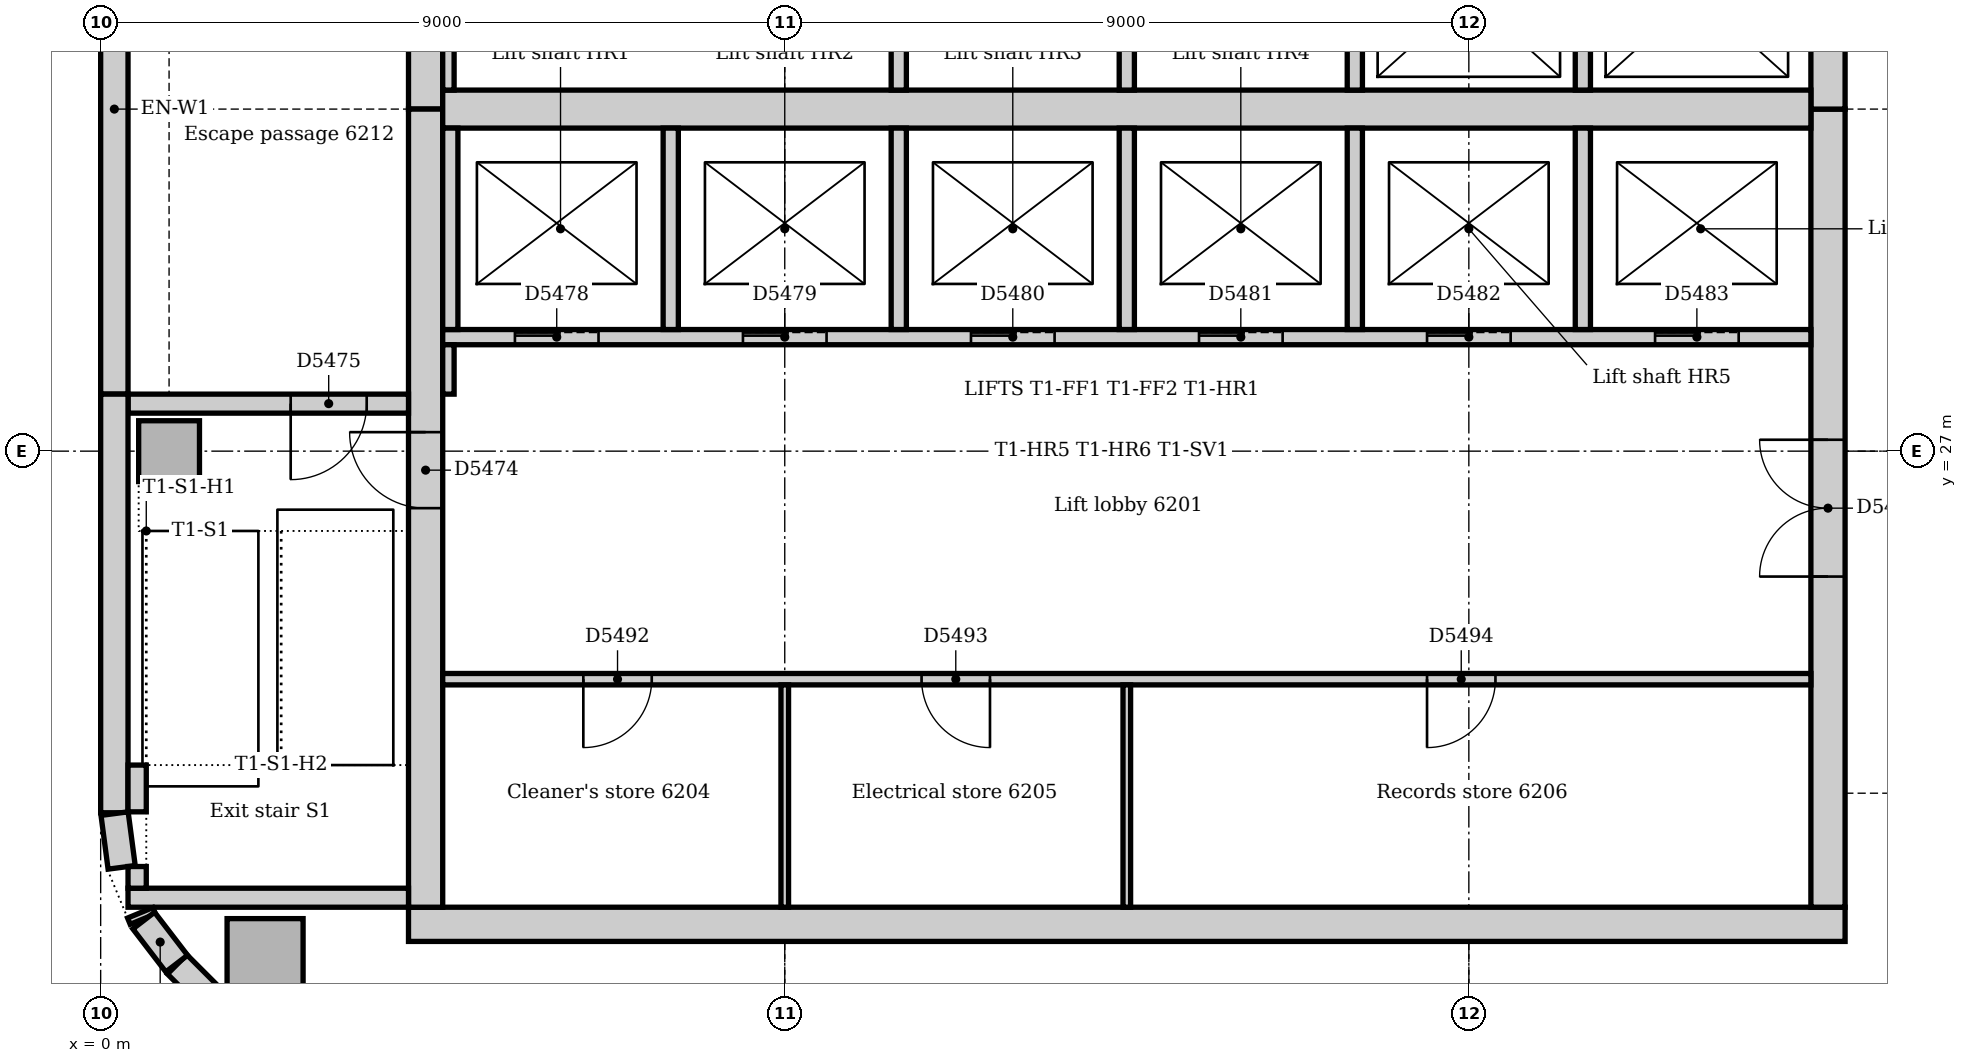
"""IFC4 building model, lengths in metres.
Left out: names, types, materials, properties, quantities, classifications, styles, units other than length and angle.
Written with IfcOpenShell. Run it as: python <this file> out.ifc"""

import sys

from ifc_helpers import new_model, si_unit, direction, frame, frame_2d, origin, origin_2d, place, context, subcontext, project, spatial, rectangle, extrude, element, fill, save


model = new_model("IFC4")
c1 = context("Model", 3, precision=1e-05, world=origin(), true_north=direction((0.0, 1.0)))
c2 = subcontext(c1, "Body", "Model", "MODEL_VIEW")
j1 = project(units=[si_unit("LENGTHUNIT", "METRE"), si_unit("PLANEANGLEUNIT", "RADIAN")], contexts=[c1])
p1 = place(None, origin())
s1 = spatial("IfcSite", under=j1, at=p1, CompositionType="ELEMENT")
p2 = place(p1, origin())
s2 = spatial("IfcBuilding", under=s1, at=p2, CompositionType="ELEMENT")
p3 = place(p2, frame((0.0, 0.0, 259.0)))
s3 = spatial("IfcBuildingStorey", under=s2, at=p3, CompositionType="ELEMENT", Elevation=259.0)
p4 = place(p3, frame((4.05, 20.775, 0.0), z_axis=(0.0, 0.0, 1.0), x_axis=(1.0, 0.0, 0.0)))
e1 = element("IfcWall", 1, at=p4, inside=s3, PredefinedType="SOLIDWALL", context=c2, shape_type="SweptSolid", body=[
    extrude(rectangle(XDim=18.9, YDim=0.45, at=frame_2d((9.45, 0.0))), origin(), (0.0, 0.0, 1.0), 4.0),
])
p5 = place(p3, frame((22.725, 21.0, 0.0), z_axis=(0.0, 0.0, 1.0), x_axis=(0.0, 1.0, 0.0)))
e2 = element("IfcWall", 2, at=p5, inside=s3, PredefinedType="SOLIDWALL", context=c2, shape_type="SweptSolid", body=[
    extrude(rectangle(XDim=10.5, YDim=0.45, at=frame_2d((5.25, 0.0))), origin(), (0.0, 0.0, 1.0), 4.0),
])
p6 = place(p5, frame((4.35, 0.0, 0.0)))
e3 = element("IfcOpeningElement", 3, at=p6, cuts=e2, PredefinedType="OPENING", context=c2, shape_type="SweptSolid", body=[
    extrude(rectangle(XDim=1.8, YDim=2.1, at=frame_2d((0.9, 1.05))), frame((0.0, 0.235, 0.0), z_axis=(0.0, -1.0, 0.0), x_axis=(1.0, 0.0, 0.0)), (0.0, 0.0, 1.0), 0.47),
])
p7 = place(p3, frame((22.725, 31.5, 0.0), z_axis=(0.0, 0.0, 1.0), x_axis=(0.0, 1.0, 0.0)))
e4 = element("IfcWall", 4, at=p7, inside=s3, PredefinedType="SOLIDWALL", context=c2, shape_type="SweptSolid", body=[
    extrude(rectangle(XDim=10.5, YDim=0.45, at=frame_2d((5.25, 0.0))), origin(), (0.0, 0.0, 1.0), 4.0),
])
p8 = place(p7, frame((3.15, 0.0, 0.0)))
e5 = element("IfcOpeningElement", 5, at=p8, cuts=e4, PredefinedType="OPENING", context=c2, shape_type="SweptSolid", body=[
    extrude(rectangle(XDim=1.0, YDim=2.1, at=frame_2d((0.5, 1.05))), frame((0.0, 0.235, 0.0), z_axis=(0.0, -1.0, 0.0), x_axis=(1.0, 0.0, 0.0)), (0.0, 0.0, 1.0), 0.47),
])
p9 = place(p7, frame((5.2, 0.0, 0.0)))
e6 = element("IfcOpeningElement", 6, at=p9, cuts=e4, PredefinedType="OPENING", context=c2, shape_type="SweptSolid", body=[
    extrude(rectangle(XDim=1.0, YDim=2.1, at=frame_2d((0.5, 1.05))), frame((0.0, 0.235, 0.0), z_axis=(0.0, -1.0, 0.0), x_axis=(1.0, 0.0, 0.0)), (0.0, 0.0, 1.0), 0.47),
])
p10 = place(p3, frame((4.275, 42.0, 0.0), z_axis=(0.0, 0.0, 1.0), x_axis=(0.0, -1.0, 0.0)))
e7 = element("IfcWall", 7, at=p10, inside=s3, PredefinedType="SOLIDWALL", context=c2, shape_type="SweptSolid", body=[
    extrude(rectangle(XDim=10.5, YDim=0.45, at=frame_2d((5.25, 0.0))), origin(), (0.0, 0.0, 1.0), 4.0),
])
p11 = place(p10, frame((5.3, 0.0, 0.0)))
e8 = element("IfcOpeningElement", 8, at=p11, cuts=e7, PredefinedType="OPENING", context=c2, shape_type="SweptSolid", body=[
    extrude(rectangle(XDim=1.0, YDim=2.1, at=frame_2d((0.5, 1.05))), frame((0.0, 0.235, 0.0), z_axis=(0.0, -1.0, 0.0), x_axis=(1.0, 0.0, 0.0)), (0.0, 0.0, 1.0), 0.47),
])
p12 = place(p3, frame((4.275, 31.5, 0.0), z_axis=(0.0, 0.0, 1.0), x_axis=(0.0, -1.0, 0.0)))
e9 = element("IfcWall", 9, at=p12, inside=s3, PredefinedType="SOLIDWALL", context=c2, shape_type="SweptSolid", body=[
    extrude(rectangle(XDim=10.5, YDim=0.45, at=frame_2d((5.25, 0.0))), origin(), (0.0, 0.0, 1.0), 4.0),
])
p13 = place(p12, frame((4.25, 0.0, 0.0)))
e10 = element("IfcOpeningElement", 10, at=p13, cuts=e9, PredefinedType="OPENING", context=c2, shape_type="SweptSolid", body=[
    extrude(rectangle(XDim=1.0, YDim=2.1, at=frame_2d((0.5, 1.05))), frame((0.0, 0.235, 0.0), z_axis=(0.0, -1.0, 0.0), x_axis=(1.0, 0.0, 0.0)), (0.0, 0.0, 1.0), 0.47),
])
p14 = place(p3, frame((4.5, 31.5, 0.0), z_axis=(0.0, 0.0, 1.0), x_axis=(1.0, 0.0, 0.0)))
e11 = element("IfcWall", 11, at=p14, inside=s3, PredefinedType="SOLIDWALL", context=c2, shape_type="SweptSolid", body=[
    extrude(rectangle(XDim=18.0, YDim=0.5, at=frame_2d((9.0, 0.0))), origin(), (0.0, 0.0, 1.0), 4.0),
])
p15 = place(p3, frame((0.36, 21.125, 0.0), z_axis=(0.0, 0.0, 1.0), x_axis=(1.0, 0.0, 0.0)))
e12 = element("IfcWall", 12, at=p15, inside=s3, PredefinedType="SOLIDWALL", context=c2, shape_type="SweptSolid", body=[
    extrude(rectangle(XDim=3.69, YDim=0.25, at=frame_2d((1.845, 0.0))), origin(), (0.0, 0.0, 1.0), 4.0),
])
p16 = place(p3, frame((4.05, 27.625, 0.0), z_axis=(0.0, 0.0, 1.0), x_axis=(-1.0, 0.0, 0.0)))
e13 = element("IfcWall", 13, at=p16, inside=s3, PredefinedType="SOLIDWALL", context=c2, shape_type="SweptSolid", body=[
    extrude(rectangle(XDim=3.69, YDim=0.25, at=frame_2d((1.845, 0.0))), origin(), (0.0, 0.0, 1.0), 4.0),
])
p17 = place(p16, frame((0.55, 0.0, 0.0)))
e14 = element("IfcOpeningElement", 14, at=p17, cuts=e13, PredefinedType="OPENING", context=c2, shape_type="SweptSolid", body=[
    extrude(rectangle(XDim=1.0, YDim=2.1, at=frame_2d((0.5, 1.05))), frame((0.0, 0.135, 0.0), z_axis=(0.0, -1.0, 0.0), x_axis=(1.0, 0.0, 0.0)), (0.0, 0.0, 1.0), 0.27),
])
p18 = place(p3, frame((2.163, 20.35, 0.0), z_axis=(0.0, 0.0, 1.0), x_axis=(1.0, 0.0, 0.0)))
e15 = element("IfcColumn", 15, at=p18, inside=s3, PredefinedType="COLUMN", context=c2, shape_type="SweptSolid", body=[
    extrude(rectangle(XDim=1.0, YDim=1.0, at=origin_2d()), origin(), (0.0, 0.0, 1.0), 3.85),
])
p19 = place(p3, frame((0.9, 27.0, 0.0), z_axis=(0.0, 0.0, 1.0), x_axis=(1.0, 0.0, 0.0)))
e16 = element("IfcColumn", 16, at=p19, inside=s3, PredefinedType="COLUMN", context=c2, shape_type="SweptSolid", body=[
    extrude(rectangle(XDim=0.8, YDim=0.8, at=origin_2d()), origin(), (0.0, 0.0, 1.0), 4.0),
])
p20 = place(p3, frame((0.18, 35.25, 0.0), z_axis=(0.0, 0.0, 1.0), x_axis=(0.0, -1.0, 0.0)))
e17 = element("IfcWall", 17, at=p20, inside=s3, PredefinedType="STANDARD", context=c2, shape_type="SweptSolid", body=[
    extrude(rectangle(XDim=7.5, YDim=0.36, at=frame_2d((3.75, 0.0))), origin(), (0.0, 0.0, 1.0), 3.85),
])
p21 = place(p3, frame((0.18, 27.75, 0.0), z_axis=(0.0, 0.0, 1.0), x_axis=(0.0, -1.0, 0.0)))
e18 = element("IfcWall", 18, at=p21, inside=s3, PredefinedType="STANDARD", context=c2, shape_type="SweptSolid", body=[
    extrude(rectangle(XDim=5.507, YDim=0.36, at=frame_2d((2.754, 0.0))), origin(), (0.0, 0.0, 1.0), 3.85),
])
p22 = place(p3, frame((1.006, 20.249, 0.0), z_axis=(0.0, 0.0, 1.0), x_axis=(0.707106781187, -0.707106781187, 0.0)))
e19 = element("IfcWall", 19, at=p22, inside=s3, PredefinedType="STANDARD", context=c2, shape_type="SweptSolid", body=[
    extrude(rectangle(XDim=1.757, YDim=0.36, at=frame_2d((0.879, 0.0))), origin(), (0.0, 0.0, 1.0), 3.85),
])
p23 = place(p3, frame((0.183, 22.231, 0.0), z_axis=(0.0, 0.0, 1.0), x_axis=(0.13055608231, -0.99144092581, 0.0)))
e20 = element("IfcWall", 20, at=p23, inside=s3, PredefinedType="STANDARD", context=c2, shape_type="SweptSolid", body=[
    extrude(rectangle(XDim=0.713, YDim=0.36, at=frame_2d((0.356, 0.0))), origin(), (0.0, 0.0, 1.0), 3.85),
])
p24 = place(p3, frame((0.521, 20.927, 0.0), z_axis=(0.0, 0.0, 1.0), x_axis=(0.382549378284, -0.923935048136, 0.0)))
e21 = element("IfcWall", 21, at=p24, inside=s3, PredefinedType="STANDARD", context=c2, shape_type="SweptSolid", body=[
    extrude(rectangle(XDim=0.089, YDim=0.36, at=frame_2d((0.045, 0.0))), origin(), (0.0, 0.0, 1.0), 3.85),
])
p25 = place(p3, frame((0.566, 20.825, 0.0), z_axis=(0.0, 0.0, 1.0), x_axis=(0.608802368033, -0.793321924995, 0.0)))
e22 = element("IfcWall", 22, at=p25, inside=s3, PredefinedType="STANDARD", context=c2, shape_type="SweptSolid", body=[
    extrude(rectangle(XDim=0.713, YDim=0.36, at=frame_2d((0.357, 0.0))), origin(), (0.0, 0.0, 1.0), 3.85),
])
p26 = place(p3, frame((0.48, 21.25, 0.0), z_axis=(0.0, 0.0, 1.0), x_axis=(0.0, 1.0, 0.0)))
e23 = element("IfcWall", 23, at=p26, inside=s3, PredefinedType="STANDARD", context=c2, shape_type="SweptSolid", body=[
    extrude(rectangle(XDim=0.285, YDim=0.24, at=frame_2d((0.143, 0.0))), origin(), (0.0, 0.0, 1.0), 4.0),
])
p27 = place(p3, frame((0.48, 22.255, 0.0), z_axis=(0.0, 0.0, 1.0), x_axis=(0.0, 1.0, 0.0)))
e24 = element("IfcWall", 24, at=p27, inside=s3, PredefinedType="STANDARD", context=c2, shape_type="SweptSolid", body=[
    extrude(rectangle(XDim=0.615, YDim=0.24, at=frame_2d((0.307, 0.0))), origin(), (0.0, 0.0, 1.0), 4.0),
])
p28 = place(p3, frame((4.5, 28.5, 0.0), z_axis=(0.0, 0.0, 1.0), x_axis=(1.0, 0.0, 0.0)))
e25 = element("IfcWall", 25, at=p28, inside=s3, PredefinedType="PARTITIONING", context=c2, shape_type="SweptSolid", body=[
    extrude(rectangle(XDim=18.0, YDim=0.2, at=frame_2d((9.0, 0.0))), origin(), (0.0, 0.0, 1.0), 3.85),
])
p29 = place(p28, frame((0.95, 0.0, 0.0)))
e26 = element("IfcOpeningElement", 26, at=p29, cuts=e25, PredefinedType="OPENING", context=c2, shape_type="SweptSolid", body=[
    extrude(rectangle(XDim=1.1, YDim=2.1, at=frame_2d((0.55, 1.05))), frame((0.0, 0.11, 0.0), z_axis=(0.0, -1.0, 0.0), x_axis=(1.0, 0.0, 0.0)), (0.0, 0.0, 1.0), 0.22),
])
p30 = place(p28, frame((3.95, 0.0, 0.0)))
e27 = element("IfcOpeningElement", 27, at=p30, cuts=e25, PredefinedType="OPENING", context=c2, shape_type="SweptSolid", body=[
    extrude(rectangle(XDim=1.1, YDim=2.1, at=frame_2d((0.55, 1.05))), frame((0.0, 0.11, 0.0), z_axis=(0.0, -1.0, 0.0), x_axis=(1.0, 0.0, 0.0)), (0.0, 0.0, 1.0), 0.22),
])
p31 = place(p28, frame((6.95, 0.0, 0.0)))
e28 = element("IfcOpeningElement", 28, at=p31, cuts=e25, PredefinedType="OPENING", context=c2, shape_type="SweptSolid", body=[
    extrude(rectangle(XDim=1.1, YDim=2.1, at=frame_2d((0.55, 1.05))), frame((0.0, 0.11, 0.0), z_axis=(0.0, -1.0, 0.0), x_axis=(1.0, 0.0, 0.0)), (0.0, 0.0, 1.0), 0.22),
])
p32 = place(p28, frame((9.95, 0.0, 0.0)))
e29 = element("IfcOpeningElement", 29, at=p32, cuts=e25, PredefinedType="OPENING", context=c2, shape_type="SweptSolid", body=[
    extrude(rectangle(XDim=1.1, YDim=2.1, at=frame_2d((0.55, 1.05))), frame((0.0, 0.11, 0.0), z_axis=(0.0, -1.0, 0.0), x_axis=(1.0, 0.0, 0.0)), (0.0, 0.0, 1.0), 0.22),
])
p33 = place(p28, frame((12.95, 0.0, 0.0)))
e30 = element("IfcOpeningElement", 30, at=p33, cuts=e25, PredefinedType="OPENING", context=c2, shape_type="SweptSolid", body=[
    extrude(rectangle(XDim=1.1, YDim=2.1, at=frame_2d((0.55, 1.05))), frame((0.0, 0.11, 0.0), z_axis=(0.0, -1.0, 0.0), x_axis=(1.0, 0.0, 0.0)), (0.0, 0.0, 1.0), 0.22),
])
p34 = place(p28, frame((15.95, 0.0, 0.0)))
e31 = element("IfcOpeningElement", 31, at=p34, cuts=e25, PredefinedType="OPENING", context=c2, shape_type="SweptSolid", body=[
    extrude(rectangle(XDim=1.1, YDim=2.1, at=frame_2d((0.55, 1.05))), frame((0.0, 0.11, 0.0), z_axis=(0.0, -1.0, 0.0), x_axis=(1.0, 0.0, 0.0)), (0.0, 0.0, 1.0), 0.22),
])
for number, where, z_axis, x_axis in (
    (32, (10.5, 28.6, 0.0), (0.0, 0.0, 1.0), (0.0, 1.0, 0.0)),
    (33, (10.5, 31.75, 0.0), (0.0, 0.0, 1.0), (0.0, 1.0, 0.0)),
    (34, (13.5, 28.6, 0.0), (0.0, 0.0, 1.0), (0.0, 1.0, 0.0)),
    (35, (13.5, 31.75, 0.0), (0.0, 0.0, 1.0), (0.0, 1.0, 0.0)),
    (36, (16.5, 28.6, 0.0), (0.0, 0.0, 1.0), (0.0, 1.0, 0.0)),
    (37, (16.5, 31.75, 0.0), (0.0, 0.0, 1.0), (0.0, 1.0, 0.0)),
    (38, (19.5, 28.6, 0.0), (0.0, 0.0, 1.0), (0.0, 1.0, 0.0)),
    (39, (19.5, 31.75, 0.0), (0.0, 0.0, 1.0), (0.0, 1.0, 0.0)),
    (40, (4.6, 28.6, 0.0), (0.0, 0.0, 1.0), (0.0, 1.0, 0.0)),
    (41, (7.5, 28.6, 0.0), (0.0, 0.0, 1.0), (0.0, 1.0, 0.0)),
):
    element("IfcWall", number, at=place(p3, frame(where, z_axis=z_axis, x_axis=x_axis)), inside=s3, PredefinedType="PARTITIONING", context=c2, shape_type="SweptSolid", body=[
        extrude(rectangle(XDim=2.65, YDim=0.2, at=frame_2d((1.325, 0.0))), origin(), (0.0, 0.0, 1.0), 3.85),
    ])
p35 = place(p3, frame((4.5, 24.0, 0.0), z_axis=(0.0, 0.0, 1.0), x_axis=(1.0, 0.0, 0.0)))
e42 = element("IfcWall", 42, at=p35, inside=s3, PredefinedType="PARTITIONING", context=c2, shape_type="SweptSolid", body=[
    extrude(rectangle(XDim=18.0, YDim=0.15, at=frame_2d((9.0, 0.0))), origin(), (0.0, 0.0, 1.0), 3.85),
])
p36 = place(p35, frame((1.85, 0.0, 0.0)))
e43 = element("IfcOpeningElement", 43, at=p36, cuts=e42, PredefinedType="OPENING", context=c2, shape_type="SweptSolid", body=[
    extrude(rectangle(XDim=0.9, YDim=2.1, at=frame_2d((0.45, 1.05))), frame((0.0, 0.085, 0.0), z_axis=(0.0, -1.0, 0.0), x_axis=(1.0, 0.0, 0.0)), (0.0, 0.0, 1.0), 0.17),
])
p37 = place(p35, frame((6.3, 0.0, 0.0)))
e44 = element("IfcOpeningElement", 44, at=p37, cuts=e42, PredefinedType="OPENING", context=c2, shape_type="SweptSolid", body=[
    extrude(rectangle(XDim=0.9, YDim=2.1, at=frame_2d((0.45, 1.05))), frame((0.0, 0.085, 0.0), z_axis=(0.0, -1.0, 0.0), x_axis=(1.0, 0.0, 0.0)), (0.0, 0.0, 1.0), 0.17),
])
p38 = place(p35, frame((12.95, 0.0, 0.0)))
e45 = element("IfcOpeningElement", 45, at=p38, cuts=e42, PredefinedType="OPENING", context=c2, shape_type="SweptSolid", body=[
    extrude(rectangle(XDim=0.9, YDim=2.1, at=frame_2d((0.45, 1.05))), frame((0.0, 0.085, 0.0), z_axis=(0.0, -1.0, 0.0), x_axis=(1.0, 0.0, 0.0)), (0.0, 0.0, 1.0), 0.17),
])
p39 = place(p3, frame((4.575, 31.75, 0.0), z_axis=(0.0, 0.0, 1.0), x_axis=(0.0, 1.0, 0.0)))
e46 = element("IfcWall", 46, at=p39, inside=s3, PredefinedType="PARTITIONING", context=c2, shape_type="SweptSolid", body=[
    extrude(rectangle(XDim=2.675, YDim=0.15, at=frame_2d((1.337, 0.0))), origin(), (0.0, 0.0, 1.0), 3.85),
])
p40 = place(p3, frame((4.575, 27.75, 0.0), z_axis=(0.0, 0.0, 1.0), x_axis=(0.0, 1.0, 0.0)))
e47 = element("IfcWall", 47, at=p40, inside=s3, PredefinedType="PARTITIONING", context=c2, shape_type="SweptSolid", body=[
    extrude(rectangle(XDim=0.65, YDim=0.15, at=frame_2d((0.325, 0.0))), origin(), (0.0, 0.0, 1.0), 3.85),
])
for number, where, z_axis, x_axis in (
    (48, (9.0, 21.0, 0.0), (0.0, 0.0, 1.0), (0.0, 1.0, 0.0)),
    (49, (13.5, 21.0, 0.0), (0.0, 0.0, 1.0), (0.0, 1.0, 0.0)),
):
    element("IfcWall", number, at=place(p3, frame(where, z_axis=z_axis, x_axis=x_axis)), inside=s3, PredefinedType="PARTITIONING", context=c2, shape_type="SweptSolid", body=[
        extrude(rectangle(XDim=2.925, YDim=0.1, at=frame_2d((1.462, 0.0))), origin(), (0.0, 0.0, 1.0), 3.85),
    ])
p41 = place(p13, frame((1.0, 0.0, 0.0), z_axis=(0.0, 0.0, 1.0), x_axis=(-1.0, 0.0, 0.0)))
e50 = element("IfcDoor", 50, at=p41, inside=s3, OperationType="SINGLE_SWING_RIGHT", PredefinedType="DOOR", context=c2, shape_type="SweptSolid", body=[
    extrude(rectangle(XDim=1.0, YDim=2.1, at=frame_2d((0.5, 1.05))), frame((0.0, 0.025, 0.0), z_axis=(0.0, -1.0, 0.0), x_axis=(1.0, 0.0, 0.0)), (0.0, 0.0, 1.0), 0.05),
])
fill(e10, e50)
p42 = place(p17, origin())
e51 = element("IfcDoor", 51, at=p42, inside=s3, OperationType="SINGLE_SWING_RIGHT", PredefinedType="DOOR", context=c2, shape_type="SweptSolid", body=[
    extrude(rectangle(XDim=1.0, YDim=2.1, at=frame_2d((0.5, 1.05))), frame((0.0, 0.025, 0.0), z_axis=(0.0, -1.0, 0.0), x_axis=(1.0, 0.0, 0.0)), (0.0, 0.0, 1.0), 0.05),
])
fill(e14, e51)
p43 = place(p29, origin())
e52 = element("IfcDoor", 52, at=p43, inside=s3, OperationType="SLIDING_TO_LEFT", PredefinedType="DOOR", context=c2, shape_type="SweptSolid", body=[
    extrude(rectangle(XDim=1.1, YDim=2.1, at=frame_2d((0.55, 1.05))), frame((0.0, 0.025, 0.0), z_axis=(0.0, -1.0, 0.0), x_axis=(1.0, 0.0, 0.0)), (0.0, 0.0, 1.0), 0.05),
])
fill(e26, e52)
p44 = place(p30, origin())
e53 = element("IfcDoor", 53, at=p44, inside=s3, OperationType="SLIDING_TO_LEFT", PredefinedType="DOOR", context=c2, shape_type="SweptSolid", body=[
    extrude(rectangle(XDim=1.1, YDim=2.1, at=frame_2d((0.55, 1.05))), frame((0.0, 0.025, 0.0), z_axis=(0.0, -1.0, 0.0), x_axis=(1.0, 0.0, 0.0)), (0.0, 0.0, 1.0), 0.05),
])
fill(e27, e53)
p45 = place(p31, origin())
e54 = element("IfcDoor", 54, at=p45, inside=s3, OperationType="SLIDING_TO_LEFT", PredefinedType="DOOR", context=c2, shape_type="SweptSolid", body=[
    extrude(rectangle(XDim=1.1, YDim=2.1, at=frame_2d((0.55, 1.05))), frame((0.0, 0.025, 0.0), z_axis=(0.0, -1.0, 0.0), x_axis=(1.0, 0.0, 0.0)), (0.0, 0.0, 1.0), 0.05),
])
fill(e28, e54)
p46 = place(p32, origin())
e55 = element("IfcDoor", 55, at=p46, inside=s3, OperationType="SLIDING_TO_LEFT", PredefinedType="DOOR", context=c2, shape_type="SweptSolid", body=[
    extrude(rectangle(XDim=1.1, YDim=2.1, at=frame_2d((0.55, 1.05))), frame((0.0, 0.025, 0.0), z_axis=(0.0, -1.0, 0.0), x_axis=(1.0, 0.0, 0.0)), (0.0, 0.0, 1.0), 0.05),
])
fill(e29, e55)
p47 = place(p33, origin())
e56 = element("IfcDoor", 56, at=p47, inside=s3, OperationType="SLIDING_TO_LEFT", PredefinedType="DOOR", context=c2, shape_type="SweptSolid", body=[
    extrude(rectangle(XDim=1.1, YDim=2.1, at=frame_2d((0.55, 1.05))), frame((0.0, 0.025, 0.0), z_axis=(0.0, -1.0, 0.0), x_axis=(1.0, 0.0, 0.0)), (0.0, 0.0, 1.0), 0.05),
])
fill(e30, e56)
p48 = place(p34, origin())
e57 = element("IfcDoor", 57, at=p48, inside=s3, OperationType="SLIDING_TO_LEFT", PredefinedType="DOOR", context=c2, shape_type="SweptSolid", body=[
    extrude(rectangle(XDim=1.1, YDim=2.1, at=frame_2d((0.55, 1.05))), frame((0.0, 0.025, 0.0), z_axis=(0.0, -1.0, 0.0), x_axis=(1.0, 0.0, 0.0)), (0.0, 0.0, 1.0), 0.05),
])
fill(e31, e57)
p49 = place(p6, origin())
e58 = element("IfcDoor", 58, at=p49, inside=s3, OperationType="DOUBLE_DOOR_DOUBLE_SWING", PredefinedType="DOOR", context=c2, shape_type="SweptSolid", body=[
    extrude(rectangle(XDim=1.8, YDim=2.1, at=frame_2d((0.9, 1.05))), frame((0.0, 0.025, 0.0), z_axis=(0.0, -1.0, 0.0), x_axis=(1.0, 0.0, 0.0)), (0.0, 0.0, 1.0), 0.05),
])
fill(e3, e58)
p50 = place(p36, frame((0.9, 0.0, 0.0), z_axis=(0.0, 0.0, 1.0), x_axis=(-1.0, 0.0, 0.0)))
e59 = element("IfcDoor", 59, at=p50, inside=s3, OperationType="SINGLE_SWING_RIGHT", PredefinedType="DOOR", context=c2, shape_type="SweptSolid", body=[
    extrude(rectangle(XDim=0.9, YDim=2.1, at=frame_2d((0.45, 1.05))), frame((0.0, 0.025, 0.0), z_axis=(0.0, -1.0, 0.0), x_axis=(1.0, 0.0, 0.0)), (0.0, 0.0, 1.0), 0.05),
])
fill(e43, e59)
p51 = place(p37, frame((0.9, 0.0, 0.0), z_axis=(0.0, 0.0, 1.0), x_axis=(-1.0, 0.0, 0.0)))
e60 = element("IfcDoor", 60, at=p51, inside=s3, OperationType="SINGLE_SWING_LEFT", PredefinedType="DOOR", context=c2, shape_type="SweptSolid", body=[
    extrude(rectangle(XDim=0.9, YDim=2.1, at=frame_2d((0.45, 1.05))), frame((0.0, 0.025, 0.0), z_axis=(0.0, -1.0, 0.0), x_axis=(1.0, 0.0, 0.0)), (0.0, 0.0, 1.0), 0.05),
])
fill(e44, e60)
p52 = place(p38, frame((0.9, 0.0, 0.0), z_axis=(0.0, 0.0, 1.0), x_axis=(-1.0, 0.0, 0.0)))
e61 = element("IfcDoor", 61, at=p52, inside=s3, OperationType="SINGLE_SWING_RIGHT", PredefinedType="DOOR", context=c2, shape_type="SweptSolid", body=[
    extrude(rectangle(XDim=0.9, YDim=2.1, at=frame_2d((0.45, 1.05))), frame((0.0, 0.025, 0.0), z_axis=(0.0, -1.0, 0.0), x_axis=(1.0, 0.0, 0.0)), (0.0, 0.0, 1.0), 0.05),
])
fill(e45, e61)
save(model, sys.argv[1])
